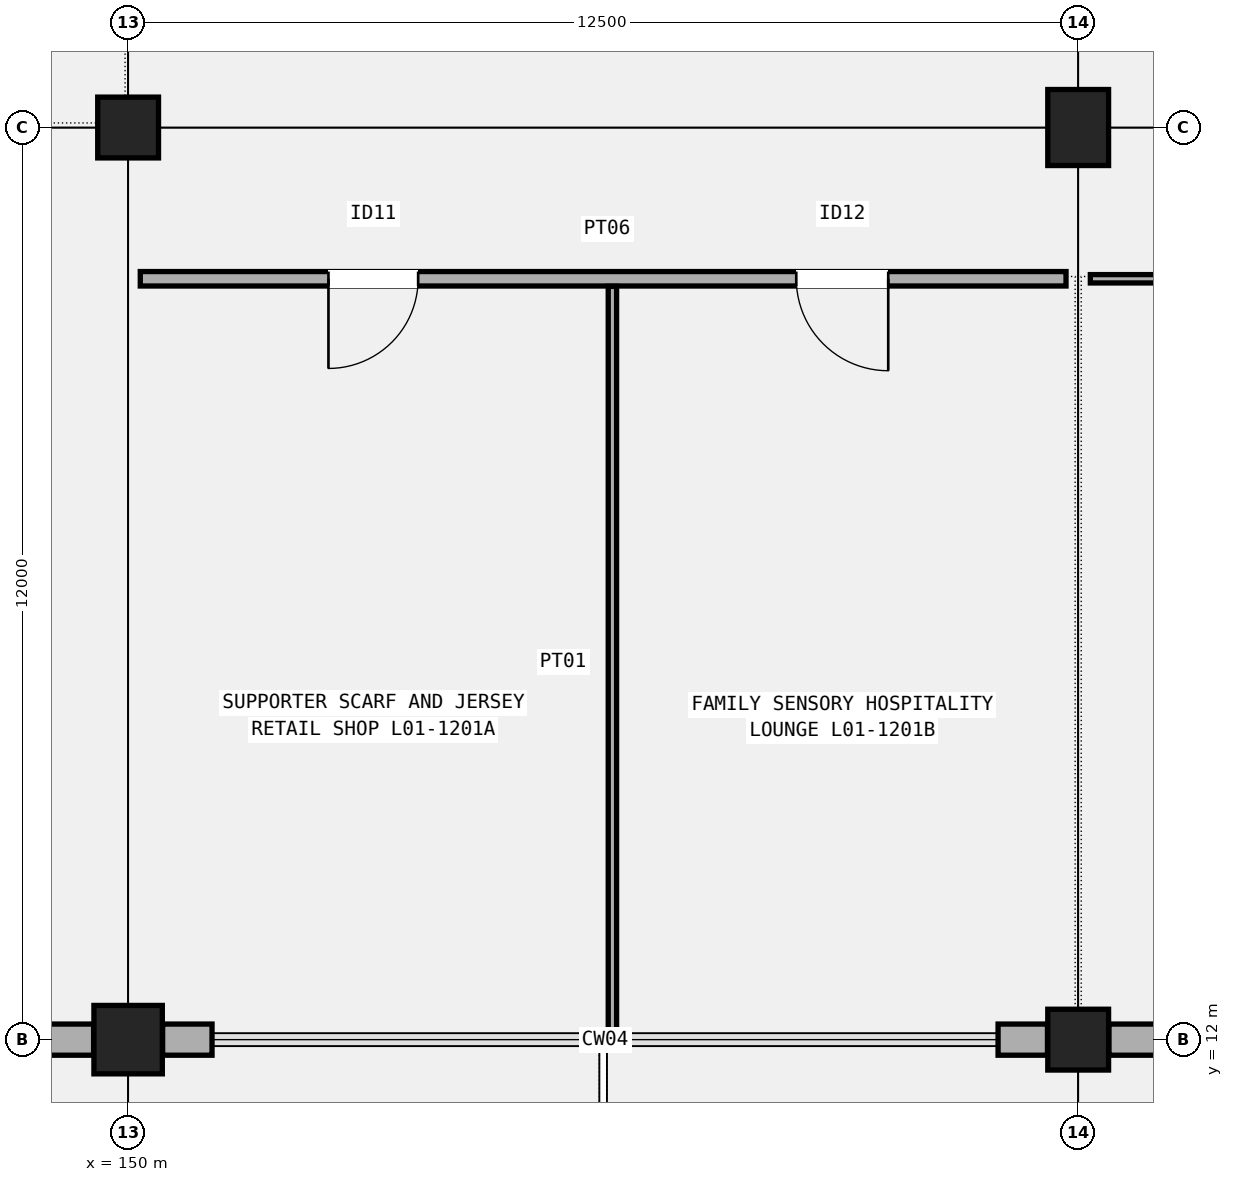
"""IFC4 building model, lengths in metres.
Left out: names, types, materials, properties, quantities, classifications, styles, units other than length and angle.
Written with IfcOpenShell. Run it as: python <this file> out.ifc"""

import sys

from ifc_helpers import new_model, si_unit, direction, frame, frame_2d, origin, origin_2d, place, context, subcontext, project, spatial, rectangle, extrude, element, fill, save


model = new_model("IFC4")
c1 = context("Model", 3, precision=1e-05, world=origin(), true_north=direction((0.0, 1.0)))
c2 = subcontext(c1, "Body", "Model", "MODEL_VIEW")
j1 = project(units=[si_unit("LENGTHUNIT", "METRE"), si_unit("PLANEANGLEUNIT", "RADIAN")], contexts=[c1])
p1 = place(None, origin())
s1 = spatial("IfcSite", under=j1, at=p1, CompositionType="ELEMENT")
p2 = place(p1, origin())
s2 = spatial("IfcBuilding", under=s1, at=p2, CompositionType="ELEMENT")
p3 = place(p2, frame((0.0, 0.0, 5.4)))
s3 = spatial("IfcBuildingStorey", under=s2, at=p3, CompositionType="ELEMENT", Elevation=5.4)
p4 = place(p3, frame((150.0, 12.0, 0.0), z_axis=(0.0, 0.0, 1.0), x_axis=(1.0, 0.0, 0.0)))
e1 = element("IfcColumn", 1, at=p4, inside=s3, PredefinedType="COLUMN", context=c2, shape_type="SweptSolid", body=[
    extrude(rectangle(XDim=0.9, YDim=0.9, at=origin_2d()), origin(), (0.0, 0.0, 1.0), 4.8),
])
for number, where, z_axis, x_axis in (
    (2, (150.0, 24.0, 0.0), (0.0, 0.0, 1.0), (1.0, 0.0, 0.0)),
    (3, (162.5, 12.0, 0.0), (0.0, 0.0, 1.0), (1.0, 0.0, 0.0)),
):
    element("IfcColumn", number, at=place(p3, frame(where, z_axis=z_axis, x_axis=x_axis)), inside=s3, PredefinedType="COLUMN", context=c2, shape_type="SweptSolid", body=[
        extrude(rectangle(XDim=0.8, YDim=0.8, at=origin_2d()), origin(), (0.0, 0.0, 1.0), 4.8),
    ])
p5 = place(p3, frame((162.5, 24.0, 0.0), z_axis=(0.0, 0.0, 1.0), x_axis=(1.0, 0.0, 0.0)))
e4 = element("IfcColumn", 4, at=p5, inside=s3, PredefinedType="COLUMN", context=c2, shape_type="SweptSolid", body=[
    extrude(rectangle(XDim=0.8, YDim=1.0, at=origin_2d()), origin(), (0.0, 0.0, 1.0), 4.8),
])
p6 = place(p3, frame((148.896, 12.0, 0.0), z_axis=(0.0, 0.0, 1.0), x_axis=(1.0, 0.0, 0.0)))
e5 = element("IfcWall", 5, at=p6, inside=s3, PredefinedType="SOLIDWALL", context=c2, shape_type="SweptSolid", body=[
    extrude(rectangle(XDim=0.65, YDim=0.41, at=frame_2d((0.325, 0.0))), origin(), (0.0, 0.0, 1.0), 4.15),
])
for number, where, z_axis, x_axis in (
    (6, (150.454, 12.0, 0.0), (0.0, 0.0, 1.0), (1.0, 0.0, 0.0)),
    (7, (161.446, 12.0, 0.0), (0.0, 0.0, 1.0), (1.0, 0.0, 0.0)),
):
    element("IfcWall", number, at=place(p3, frame(where, z_axis=z_axis, x_axis=x_axis)), inside=s3, PredefinedType="SOLIDWALL", context=c2, shape_type="SweptSolid", body=[
        extrude(rectangle(XDim=0.65, YDim=0.41, at=frame_2d((0.325, 0.0))), origin(), (0.0, 0.0, 1.0), 4.2),
    ])
p7 = place(p3, frame((162.904, 12.0, 0.0), z_axis=(0.0, 0.0, 1.0), x_axis=(1.0, 0.0, 0.0)))
e8 = element("IfcWall", 8, at=p7, inside=s3, PredefinedType="SOLIDWALL", context=c2, shape_type="SweptSolid", body=[
    extrude(rectangle(XDim=0.65, YDim=0.41, at=frame_2d((0.325, 0.0))), origin(), (0.0, 0.0, 1.0), 4.15),
])
p8 = place(p3, frame((150.16, 22.01, 0.0), z_axis=(0.0, 0.0, 1.0), x_axis=(1.0, 0.0, 0.0)))
e9 = element("IfcWall", 9, at=p8, inside=s3, PredefinedType="PARTITIONING", context=c2, shape_type="SweptSolid", body=[
    extrude(rectangle(XDim=12.18, YDim=0.19, at=frame_2d((6.09, 0.0))), origin(), (0.0, 0.0, 1.0), 3.92),
])
p9 = place(p8, frame((3.656, 0.0, 0.0), z_axis=(0.0, 0.0, 1.0), x_axis=(-1.0, 0.0, 0.0)))
e10 = element("IfcOpeningElement", 10, at=p9, cuts=e9, PredefinedType="OPENING", context=c2, shape_type="SweptSolid", body=[
    extrude(rectangle(XDim=1.18, YDim=2.2, at=frame_2d((0.59, 1.1))), frame((0.0, 0.105, 0.0), z_axis=(0.0, -1.0, 0.0), x_axis=(1.0, 0.0, 0.0)), (0.0, 0.0, 1.0), 0.21),
])
p10 = place(p8, frame((9.841, 0.0, 0.0), z_axis=(0.0, 0.0, 1.0), x_axis=(-1.0, 0.0, 0.0)))
e11 = element("IfcOpeningElement", 11, at=p10, cuts=e9, PredefinedType="OPENING", context=c2, shape_type="SweptSolid", body=[
    extrude(rectangle(XDim=1.21, YDim=2.18, at=frame_2d((0.605, 1.09))), frame((0.0, 0.105, 0.0), z_axis=(0.0, -1.0, 0.0), x_axis=(1.0, 0.0, 0.0)), (0.0, 0.0, 1.0), 0.21),
])
p11 = place(p3, frame((156.372, 12.024, 0.0), z_axis=(0.0, 0.0, 1.0), x_axis=(0.0, 1.0, 0.0)))
e12 = element("IfcWall", 12, at=p11, inside=s3, PredefinedType="PARTITIONING", context=c2, shape_type="SweptSolid", body=[
    extrude(rectangle(XDim=9.886, YDim=0.11, at=frame_2d((4.943, 0.0))), origin(), (0.0, 0.0, 1.0), 3.92),
])
p12 = place(p3, frame((162.66, 22.01, 0.0), z_axis=(0.0, 0.0, 1.0), x_axis=(1.0, 0.0, 0.0)))
e13 = element("IfcWall", 13, at=p12, inside=s3, PredefinedType="PARTITIONING", context=c2, shape_type="SweptSolid", body=[
    extrude(rectangle(XDim=12.18, YDim=0.11, at=frame_2d((6.09, 0.0))), origin(), (0.0, 0.0, 1.0), 3.92),
])
p13 = place(p12, frame((6.74, 0.0, 0.0), z_axis=(0.0, 0.0, 1.0), x_axis=(-1.0, 0.0, 0.0)))
e14 = element("IfcOpeningElement", 14, at=p13, cuts=e13, PredefinedType="OPENING", context=c2, shape_type="SweptSolid", body=[
    extrude(rectangle(XDim=1.3, YDim=2.24, at=frame_2d((0.65, 1.12))), frame((0.0, 0.065, 0.0), z_axis=(0.0, -1.0, 0.0), x_axis=(1.0, 0.0, 0.0)), (0.0, 0.0, 1.0), 0.13),
])
p14 = place(p9, origin())
e15 = element("IfcDoor", 15, at=p14, inside=s3, OperationType="SINGLE_SWING_RIGHT", PredefinedType="DOOR", context=c2, shape_type="SweptSolid", body=[
    extrude(rectangle(XDim=1.18, YDim=2.2, at=frame_2d((0.59, 1.1))), frame((0.0, 0.025, 0.0), z_axis=(0.0, -1.0, 0.0), x_axis=(1.0, 0.0, 0.0)), (0.0, 0.0, 1.0), 0.05),
])
fill(e10, e15)
p15 = place(p10, origin())
e16 = element("IfcDoor", 16, at=p15, inside=s3, OperationType="SINGLE_SWING_LEFT", PredefinedType="DOOR", context=c2, shape_type="SweptSolid", body=[
    extrude(rectangle(XDim=1.21, YDim=2.18, at=frame_2d((0.605, 1.09))), frame((0.0, 0.025, 0.0), z_axis=(0.0, -1.0, 0.0), x_axis=(1.0, 0.0, 0.0)), (0.0, 0.0, 1.0), 0.05),
])
fill(e11, e16)
save(model, sys.argv[1])
